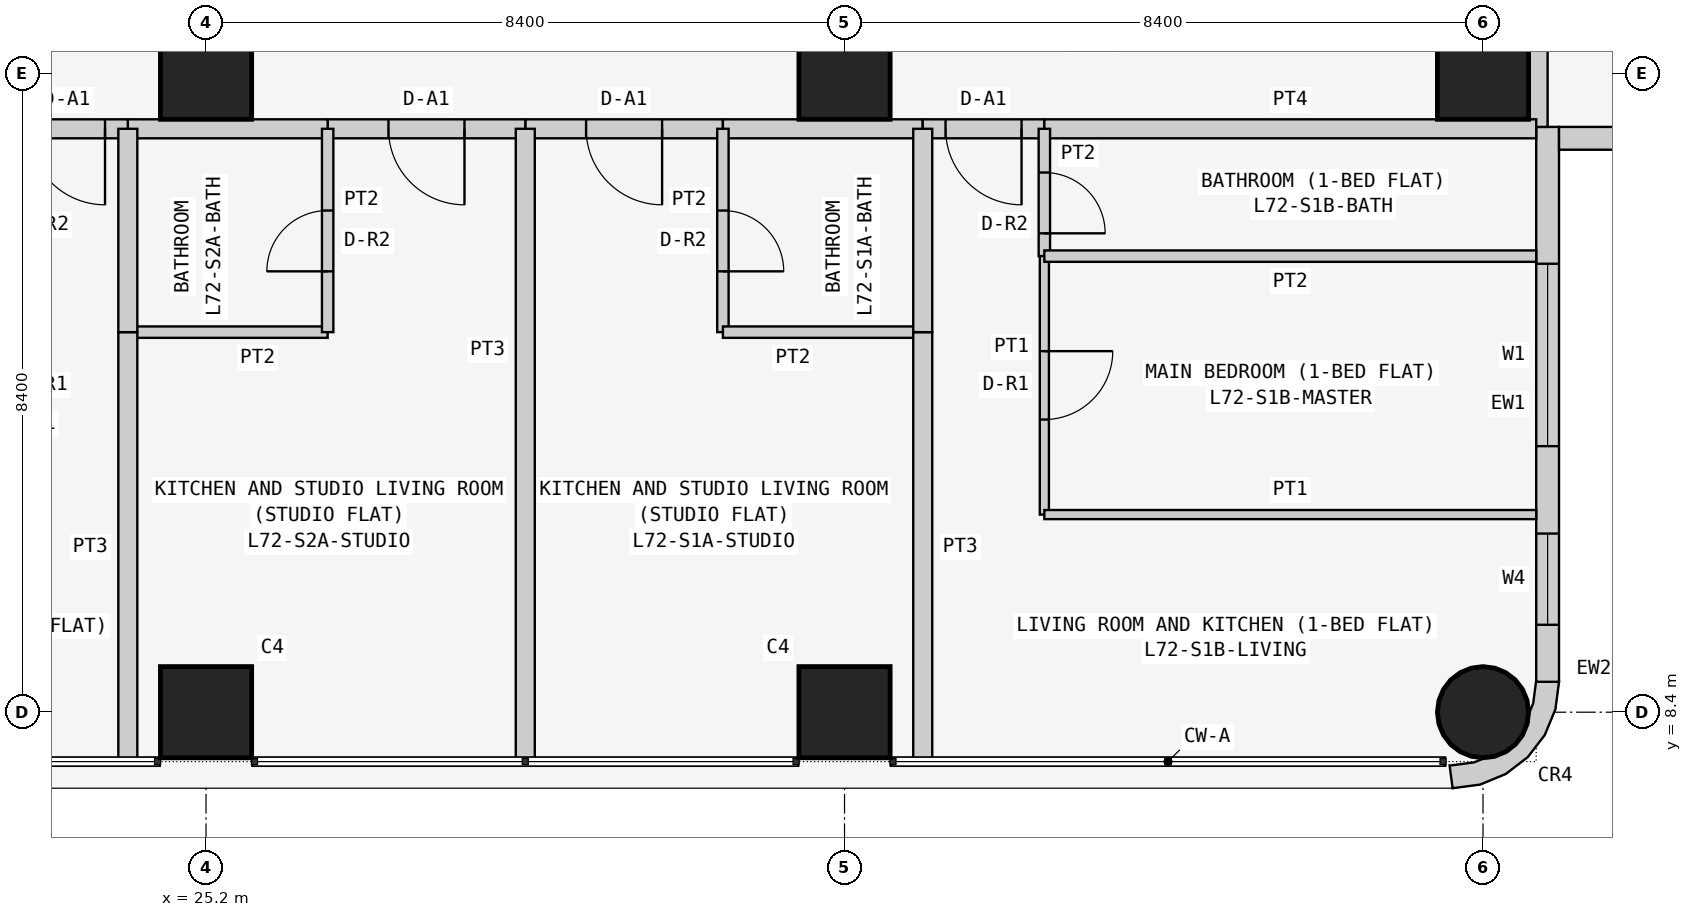
"""IFC4 building model, lengths in metres.
Left out: names, types, materials, properties, quantities, classifications, styles, units other than length and angle.
Written with IfcOpenShell. Run it as: python <this file> out.ifc"""

import sys

from ifc_helpers import new_model, si_unit, direction, frame, frame_2d, origin, origin_2d, place, context, subcontext, project, spatial, polyline, rectangle, circle, outline, extrude, element, fill, save


model = new_model("IFC4")
c1 = context("Model", 3, precision=1e-05, world=origin(), true_north=direction((0.0, 1.0)))
c2 = subcontext(c1, "Body", "Model", "MODEL_VIEW")
j1 = project(units=[si_unit("LENGTHUNIT", "METRE"), si_unit("PLANEANGLEUNIT", "RADIAN")], contexts=[c1])
p1 = place(None, origin())
s1 = spatial("IfcSite", under=j1, at=p1, CompositionType="ELEMENT")
p2 = place(p1, origin())
s2 = spatial("IfcBuilding", under=s1, at=p2, CompositionType="ELEMENT")
p3 = place(p2, frame((0.0, 0.0, 275.7)))
s3 = spatial("IfcBuildingStorey", under=s2, at=p3, CompositionType="ELEMENT", Elevation=275.7)
for number, where, z_axis, x_axis in (
    (1, (25.2, 8.4, 0.0), (0.0, 0.0, 1.0), (1.0, 0.0, 0.0)),
    (2, (25.2, 16.8, 0.0), (0.0, 0.0, 1.0), (1.0, 0.0, 0.0)),
    (3, (33.6, 8.4, 0.0), (0.0, 0.0, 1.0), (1.0, 0.0, 0.0)),
    (4, (33.6, 16.8, 0.0), (0.0, 0.0, 1.0), (1.0, 0.0, 0.0)),
):
    element("IfcColumn", number, at=place(p3, frame(where, z_axis=z_axis, x_axis=x_axis)), inside=s3, PredefinedType="COLUMN", context=c2, shape_type="SweptSolid", body=[
        extrude(rectangle(XDim=1.2, YDim=1.2, at=origin_2d()), origin(), (0.0, 0.0, 1.0), 3.6),
    ])
p4 = place(p3, frame((42.0, 8.4, 0.0), z_axis=(0.0, 0.0, 1.0), x_axis=(1.0, 0.0, 0.0)))
e5 = element("IfcColumn", 5, at=p4, inside=s3, PredefinedType="COLUMN", context=c2, shape_type="SweptSolid", body=[
    extrude(circle(Radius=0.6, at=origin_2d()), origin(), (0.0, 0.0, 1.0), 3.6),
])
p5 = place(p3, frame((42.0, 16.8, 0.0), z_axis=(0.0, 0.0, 1.0), x_axis=(1.0, 0.0, 0.0)))
e6 = element("IfcColumn", 6, at=p5, inside=s3, PredefinedType="COLUMN", context=c2, shape_type="SweptSolid", body=[
    extrude(rectangle(XDim=1.2, YDim=1.2, at=origin_2d()), origin(), (0.0, 0.0, 1.0), 3.6),
])
p6 = place(p3, frame((42.85, 8.8, 0.0), z_axis=(0.0, 0.0, 1.0), x_axis=(0.0, 1.0, 0.0)))
e7 = element("IfcWall", 7, at=p6, inside=s3, PredefinedType="SOLIDWALL", context=c2, shape_type="SweptSolid", body=[
    extrude(rectangle(XDim=7.3, YDim=0.3, at=frame_2d((3.65, 0.0))), origin(), (0.0, 0.0, 1.0), 3.45),
])
p7 = place(p6, frame((3.1, 0.0, 0.9)))
e8 = element("IfcOpeningElement", 8, at=p7, cuts=e7, PredefinedType="OPENING", context=c2, shape_type="SweptSolid", body=[
    extrude(rectangle(XDim=2.4, YDim=1.5, at=frame_2d((1.2, 0.75))), frame((0.0, 0.16, 0.0), z_axis=(0.0, -1.0, 0.0), x_axis=(1.0, 0.0, 0.0)), (0.0, 0.0, 1.0), 0.32),
])
p8 = place(p6, frame((0.75, 0.0, 0.9)))
e9 = element("IfcOpeningElement", 9, at=p8, cuts=e7, PredefinedType="OPENING", context=c2, shape_type="SweptSolid", body=[
    extrude(rectangle(XDim=1.2, YDim=1.5, at=frame_2d((0.6, 0.75))), frame((0.0, 0.16, 0.0), z_axis=(0.0, -1.0, 0.0), x_axis=(1.0, 0.0, 0.0)), (0.0, 0.0, 1.0), 0.32),
])
p9 = place(p3, frame((43.0, 15.95, 0.0), z_axis=(0.0, 0.0, 1.0), x_axis=(1.0, 0.0, 0.0)))
e10 = element("IfcWall", 10, at=p9, inside=s3, PredefinedType="SOLIDWALL", context=c2, shape_type="SweptSolid", body=[
    extrude(rectangle(XDim=7.0, YDim=0.3, at=frame_2d((3.5, 0.0))), origin(), (0.0, 0.0, 1.0), 3.45),
])
p10 = place(p9, frame((1.5, 0.0, 0.9)))
e11 = element("IfcOpeningElement", 11, at=p10, cuts=e10, PredefinedType="OPENING", context=c2, shape_type="SweptSolid", body=[
    extrude(rectangle(XDim=2.4, YDim=1.5, at=frame_2d((1.2, 0.75))), frame((0.0, 0.16, 0.0), z_axis=(0.0, -1.0, 0.0), x_axis=(1.0, 0.0, 0.0)), (0.0, 0.0, 1.0), 0.32),
])
p11 = place(p9, frame((5.05, 0.0, 0.9)))
e12 = element("IfcOpeningElement", 12, at=p11, cuts=e10, PredefinedType="OPENING", context=c2, shape_type="SweptSolid", body=[
    extrude(rectangle(XDim=1.2, YDim=1.5, at=frame_2d((0.6, 0.75))), frame((0.0, 0.16, 0.0), z_axis=(0.0, -1.0, 0.0), x_axis=(1.0, 0.0, 0.0)), (0.0, 0.0, 1.0), 0.32),
])
p12 = place(p3, frame((41.638, 7.824, 0.0), z_axis=(0.0, 0.0, 1.0), x_axis=(0.707106781187, -0.707106781187, 0.0)))
e13 = element("IfcWall", 13, at=p12, inside=s3, PredefinedType="SOLIDWALL", context=c2, shape_type="SweptSolid", body=[
    extrude(outline(polyline([(0.033, 1.469), (0.047, 1.455), (0.233, 1.212), (0.292, 1.069), (0.358, 1.003), (0.449, 0.782), (0.449, 0.543), (0.358, 0.322), (0.292, 0.257), (0.233, 0.114), (0.047, -0.129), (0.033, -0.143), (0.273, -0.327), (0.495, -0.037), (0.635, 0.301), (0.683, 0.663), (0.635, 1.025), (0.495, 1.363), (0.273, 1.653), (0.033, 1.469)])), origin(), (0.0, 0.0, 1.0), 3.45),
])
p13 = place(p3, frame((42.725, 22.971, 0.0), z_axis=(0.0, 0.0, 1.0), x_axis=(0.0, -1.0, 0.0)))
e14 = element("IfcWall", 14, at=p13, inside=s3, PredefinedType="PARTITIONING", context=c2, shape_type="SweptSolid", body=[
    extrude(rectangle(XDim=6.871, YDim=0.25, at=frame_2d((3.436, 0.0))), origin(), (0.0, 0.0, 1.0), 3.45),
])
p14 = place(p3, frame((32.0, 16.075, 0.0), z_axis=(0.0, 0.0, 1.0), x_axis=(-1.0, 0.0, 0.0)))
e15 = element("IfcWall", 15, at=p14, inside=s3, PredefinedType="PARTITIONING", context=c2, shape_type="SweptSolid", body=[
    extrude(rectangle(XDim=2.6, YDim=0.25, at=frame_2d((1.3, 0.0))), origin(), (0.0, 0.0, 1.0), 3.45),
])
p15 = place(p14, frame((0.8, 0.0, 0.0)))
e16 = element("IfcOpeningElement", 16, at=p15, cuts=e15, PredefinedType="OPENING", context=c2, shape_type="SweptSolid", body=[
    extrude(rectangle(XDim=1.0, YDim=2.1, at=frame_2d((0.5, 1.05))), frame((0.0, 0.135, 0.0), z_axis=(0.0, -1.0, 0.0), x_axis=(1.0, 0.0, 0.0)), (0.0, 0.0, 1.0), 0.27),
])
p16 = place(p3, frame((34.629, 16.075, 0.0), z_axis=(0.0, 0.0, 1.0), x_axis=(-1.0, 0.0, 0.0)))
e17 = element("IfcWall", 17, at=p16, inside=s3, PredefinedType="PARTITIONING", context=c2, shape_type="SweptSolid", body=[
    extrude(rectangle(XDim=2.629, YDim=0.25, at=frame_2d((1.314, 0.0))), origin(), (0.0, 0.0, 1.0), 3.45),
])
p17 = place(p3, frame((36.229, 16.075, 0.0), z_axis=(0.0, 0.0, 1.0), x_axis=(-1.0, 0.0, 0.0)))
e18 = element("IfcWall", 18, at=p17, inside=s3, PredefinedType="PARTITIONING", context=c2, shape_type="SweptSolid", body=[
    extrude(rectangle(XDim=1.6, YDim=0.25, at=frame_2d((0.8, 0.0))), origin(), (0.0, 0.0, 1.0), 3.45),
])
p18 = place(p17, frame((0.3, 0.0, 0.0)))
e19 = element("IfcOpeningElement", 19, at=p18, cuts=e18, PredefinedType="OPENING", context=c2, shape_type="SweptSolid", body=[
    extrude(rectangle(XDim=1.0, YDim=2.1, at=frame_2d((0.5, 1.05))), frame((0.0, 0.135, 0.0), z_axis=(0.0, -1.0, 0.0), x_axis=(1.0, 0.0, 0.0)), (0.0, 0.0, 1.0), 0.27),
])
p19 = place(p3, frame((42.7, 16.075, 0.0), z_axis=(0.0, 0.0, 1.0), x_axis=(-1.0, 0.0, 0.0)))
e20 = element("IfcWall", 20, at=p19, inside=s3, PredefinedType="PARTITIONING", context=c2, shape_type="SweptSolid", body=[
    extrude(rectangle(XDim=6.471, YDim=0.25, at=frame_2d((3.235, 0.0))), origin(), (0.0, 0.0, 1.0), 3.45),
])
p20 = place(p3, frame((29.4, 16.075, 0.0), z_axis=(0.0, 0.0, 1.0), x_axis=(-1.0, 0.0, 0.0)))
e21 = element("IfcWall", 21, at=p20, inside=s3, PredefinedType="PARTITIONING", context=c2, shape_type="SweptSolid", body=[
    extrude(rectangle(XDim=2.6, YDim=0.25, at=frame_2d((1.3, 0.0))), origin(), (0.0, 0.0, 1.0), 3.45),
])
p21 = place(p20, frame((0.8, 0.0, 0.0)))
e22 = element("IfcOpeningElement", 22, at=p21, cuts=e21, PredefinedType="OPENING", context=c2, shape_type="SweptSolid", body=[
    extrude(rectangle(XDim=1.0, YDim=2.1, at=frame_2d((0.5, 1.05))), frame((0.0, 0.135, 0.0), z_axis=(0.0, -1.0, 0.0), x_axis=(1.0, 0.0, 0.0)), (0.0, 0.0, 1.0), 0.27),
])
p22 = place(p3, frame((26.8, 16.075, 0.0), z_axis=(0.0, 0.0, 1.0), x_axis=(-1.0, 0.0, 0.0)))
e23 = element("IfcWall", 23, at=p22, inside=s3, PredefinedType="PARTITIONING", context=c2, shape_type="SweptSolid", body=[
    extrude(rectangle(XDim=2.629, YDim=0.25, at=frame_2d((1.314, 0.0))), origin(), (0.0, 0.0, 1.0), 3.45),
])
p23 = place(p3, frame((24.171, 16.075, 0.0), z_axis=(0.0, 0.0, 1.0), x_axis=(-1.0, 0.0, 0.0)))
e24 = element("IfcWall", 24, at=p23, inside=s3, PredefinedType="PARTITIONING", context=c2, shape_type="SweptSolid", body=[
    extrude(rectangle(XDim=1.6, YDim=0.25, at=frame_2d((0.8, 0.0))), origin(), (0.0, 0.0, 1.0), 3.45),
])
p24 = place(p23, frame((0.3, 0.0, 0.0)))
e25 = element("IfcOpeningElement", 25, at=p24, cuts=e24, PredefinedType="OPENING", context=c2, shape_type="SweptSolid", body=[
    extrude(rectangle(XDim=1.0, YDim=2.1, at=frame_2d((0.5, 1.05))), frame((0.0, 0.135, 0.0), z_axis=(0.0, -1.0, 0.0), x_axis=(1.0, 0.0, 0.0)), (0.0, 0.0, 1.0), 0.27),
])
p25 = place(p3, frame((32.0, 16.075, 0.0), z_axis=(0.0, 0.0, 1.0), x_axis=(0.0, -1.0, 0.0)))
e26 = element("IfcWall", 26, at=p25, inside=s3, PredefinedType="PARTITIONING", context=c2, shape_type="SweptSolid", body=[
    extrude(rectangle(XDim=2.675, YDim=0.15, at=frame_2d((1.337, 0.0))), origin(), (0.0, 0.0, 1.0), 3.45),
])
p26 = place(p25, frame((1.075, 0.0, 0.0)))
e27 = element("IfcOpeningElement", 27, at=p26, cuts=e26, PredefinedType="OPENING", context=c2, shape_type="SweptSolid", body=[
    extrude(rectangle(XDim=0.8, YDim=2.1, at=frame_2d((0.4, 1.05))), frame((0.0, 0.085, 0.0), z_axis=(0.0, -1.0, 0.0), x_axis=(1.0, 0.0, 0.0)), (0.0, 0.0, 1.0), 0.17),
])
p27 = place(p3, frame((32.0, 13.4, 0.0), z_axis=(0.0, 0.0, 1.0), x_axis=(1.0, 0.0, 0.0)))
e28 = element("IfcWall", 28, at=p27, inside=s3, PredefinedType="PARTITIONING", context=c2, shape_type="SweptSolid", body=[
    extrude(rectangle(XDim=2.629, YDim=0.15, at=frame_2d((1.314, 0.0))), origin(), (0.0, 0.0, 1.0), 3.45),
])
p28 = place(p3, frame((34.629, 13.4, 0.0), z_axis=(0.0, 0.0, 1.0), x_axis=(0.0, -1.0, 0.0)))
e29 = element("IfcWall", 29, at=p28, inside=s3, PredefinedType="PARTITIONING", context=c2, shape_type="SweptSolid", body=[
    extrude(rectangle(XDim=5.65, YDim=0.25, at=frame_2d((2.825, 0.0))), origin(), (0.0, 0.0, 1.0), 3.45),
])
p29 = place(p3, frame((29.4, 7.75, 0.0), z_axis=(0.0, 0.0, 1.0), x_axis=(0.0, 1.0, 0.0)))
e30 = element("IfcWall", 30, at=p29, inside=s3, PredefinedType="PARTITIONING", context=c2, shape_type="SweptSolid", body=[
    extrude(rectangle(XDim=8.325, YDim=0.25, at=frame_2d((4.163, 0.0))), origin(), (0.0, 0.0, 1.0), 2.848),
])
p30 = place(p3, frame((34.629, 13.4, 0.0), z_axis=(0.0, 0.0, 1.0), x_axis=(0.0, 1.0, 0.0)))
e31 = element("IfcWall", 31, at=p30, inside=s3, PredefinedType="PARTITIONING", context=c2, shape_type="SweptSolid", body=[
    extrude(rectangle(XDim=2.675, YDim=0.25, at=frame_2d((1.337, 0.0))), origin(), (0.0, 0.0, 1.0), 3.45),
])
p31 = place(p3, frame((36.229, 16.075, 0.0), z_axis=(0.0, 0.0, 1.0), x_axis=(0.0, -1.0, 0.0)))
e32 = element("IfcWall", 32, at=p31, inside=s3, PredefinedType="PARTITIONING", context=c2, shape_type="SweptSolid", body=[
    extrude(rectangle(XDim=1.675, YDim=0.15, at=frame_2d((0.837, 0.0))), origin(), (0.0, 0.0, 1.0), 3.45),
])
p32 = place(p31, frame((0.575, 0.0, 0.0)))
e33 = element("IfcOpeningElement", 33, at=p32, cuts=e32, PredefinedType="OPENING", context=c2, shape_type="SweptSolid", body=[
    extrude(rectangle(XDim=0.8, YDim=2.1, at=frame_2d((0.4, 1.05))), frame((0.0, 0.085, 0.0), z_axis=(0.0, -1.0, 0.0), x_axis=(1.0, 0.0, 0.0)), (0.0, 0.0, 1.0), 0.17),
])
p33 = place(p3, frame((36.229, 14.4, 0.0), z_axis=(0.0, 0.0, 1.0), x_axis=(0.0, -1.0, 0.0)))
e34 = element("IfcWall", 34, at=p33, inside=s3, PredefinedType="PARTITIONING", context=c2, shape_type="SweptSolid", body=[
    extrude(rectangle(XDim=3.4, YDim=0.12, at=frame_2d((1.7, 0.0))), origin(), (0.0, 0.0, 1.0), 3.45),
])
p34 = place(p33, frame((1.25, 0.0, 0.0)))
e35 = element("IfcOpeningElement", 35, at=p34, cuts=e34, PredefinedType="OPENING", context=c2, shape_type="SweptSolid", body=[
    extrude(rectangle(XDim=0.9, YDim=2.1, at=frame_2d((0.45, 1.05))), frame((0.0, 0.07, 0.0), z_axis=(0.0, -1.0, 0.0), x_axis=(1.0, 0.0, 0.0)), (0.0, 0.0, 1.0), 0.14),
])
p35 = place(p3, frame((36.229, 11.0, 0.0), z_axis=(0.0, 0.0, 1.0), x_axis=(1.0, 0.0, 0.0)))
e36 = element("IfcWall", 36, at=p35, inside=s3, PredefinedType="PARTITIONING", context=c2, shape_type="SweptSolid", body=[
    extrude(rectangle(XDim=6.471, YDim=0.12, at=frame_2d((3.235, 0.0))), origin(), (0.0, 0.0, 1.0), 3.45),
])
p36 = place(p3, frame((36.229, 14.4, 0.0), z_axis=(0.0, 0.0, 1.0), x_axis=(1.0, 0.0, 0.0)))
e37 = element("IfcWall", 37, at=p36, inside=s3, PredefinedType="PARTITIONING", context=c2, shape_type="SweptSolid", body=[
    extrude(rectangle(XDim=6.471, YDim=0.15, at=frame_2d((3.235, 0.0))), origin(), (0.0, 0.0, 1.0), 3.45),
])
p37 = place(p3, frame((24.171, 13.4, 0.0), z_axis=(0.0, 0.0, 1.0), x_axis=(1.0, 0.0, 0.0)))
e38 = element("IfcWall", 38, at=p37, inside=s3, PredefinedType="PARTITIONING", context=c2, shape_type="SweptSolid", body=[
    extrude(rectangle(XDim=2.629, YDim=0.15, at=frame_2d((1.314, 0.0))), origin(), (0.0, 0.0, 1.0), 3.45),
])
p38 = place(p3, frame((26.8, 13.4, 0.0), z_axis=(0.0, 0.0, 1.0), x_axis=(0.0, 1.0, 0.0)))
e39 = element("IfcWall", 39, at=p38, inside=s3, PredefinedType="PARTITIONING", context=c2, shape_type="SweptSolid", body=[
    extrude(rectangle(XDim=2.675, YDim=0.15, at=frame_2d((1.337, 0.0))), origin(), (0.0, 0.0, 1.0), 3.45),
])
p39 = place(p38, frame((0.8, 0.0, 0.0)))
e40 = element("IfcOpeningElement", 40, at=p39, cuts=e39, PredefinedType="OPENING", context=c2, shape_type="SweptSolid", body=[
    extrude(rectangle(XDim=0.8, YDim=2.1, at=frame_2d((0.4, 1.05))), frame((0.0, 0.085, 0.0), z_axis=(0.0, -1.0, 0.0), x_axis=(1.0, 0.0, 0.0)), (0.0, 0.0, 1.0), 0.17),
])
p40 = place(p3, frame((24.171, 7.75, 0.0), z_axis=(0.0, 0.0, 1.0), x_axis=(0.0, 1.0, 0.0)))
e41 = element("IfcWall", 41, at=p40, inside=s3, PredefinedType="PARTITIONING", context=c2, shape_type="SweptSolid", body=[
    extrude(rectangle(XDim=5.65, YDim=0.25, at=frame_2d((2.825, 0.0))), origin(), (0.0, 0.0, 1.0), 3.45),
])
p41 = place(p3, frame((24.171, 13.4, 0.0), z_axis=(0.0, 0.0, 1.0), x_axis=(0.0, 1.0, 0.0)))
e42 = element("IfcWall", 42, at=p41, inside=s3, PredefinedType="PARTITIONING", context=c2, shape_type="SweptSolid", body=[
    extrude(rectangle(XDim=2.675, YDim=0.25, at=frame_2d((1.337, 0.0))), origin(), (0.0, 0.0, 1.0), 3.45),
])
p42 = place(p7, origin())
e43 = element("IfcWindow", 43, at=p42, inside=s3, PartitioningType="SINGLE_PANEL", PredefinedType="WINDOW", context=c2, shape_type="SweptSolid", body=[
    extrude(rectangle(XDim=2.4, YDim=1.5, at=frame_2d((1.2, 0.75))), frame((0.0, 0.03, 0.0), z_axis=(0.0, -1.0, 0.0), x_axis=(1.0, 0.0, 0.0)), (0.0, 0.0, 1.0), 0.06),
])
fill(e8, e43)
p43 = place(p8, origin())
e44 = element("IfcWindow", 44, at=p43, inside=s3, PartitioningType="SINGLE_PANEL", PredefinedType="WINDOW", context=c2, shape_type="SweptSolid", body=[
    extrude(rectangle(XDim=1.2, YDim=1.5, at=frame_2d((0.6, 0.75))), frame((0.0, 0.03, 0.0), z_axis=(0.0, -1.0, 0.0), x_axis=(1.0, 0.0, 0.0)), (0.0, 0.0, 1.0), 0.06),
])
fill(e9, e44)
p44 = place(p15, origin())
e45 = element("IfcDoor", 45, at=p44, inside=s3, OperationType="SINGLE_SWING_LEFT", PredefinedType="DOOR", context=c2, shape_type="SweptSolid", body=[
    extrude(rectangle(XDim=1.0, YDim=2.1, at=frame_2d((0.5, 1.05))), frame((0.0, 0.025, 0.0), z_axis=(0.0, -1.0, 0.0), x_axis=(1.0, 0.0, 0.0)), (0.0, 0.0, 1.0), 0.05),
])
fill(e16, e45)
p45 = place(p26, origin())
e46 = element("IfcDoor", 46, at=p45, inside=s3, OperationType="SINGLE_SWING_RIGHT", PredefinedType="DOOR", context=c2, shape_type="SweptSolid", body=[
    extrude(rectangle(XDim=0.8, YDim=2.1, at=frame_2d((0.4, 1.05))), frame((0.0, 0.025, 0.0), z_axis=(0.0, -1.0, 0.0), x_axis=(1.0, 0.0, 0.0)), (0.0, 0.0, 1.0), 0.05),
])
fill(e27, e46)
p46 = place(p18, origin())
e47 = element("IfcDoor", 47, at=p46, inside=s3, OperationType="SINGLE_SWING_LEFT", PredefinedType="DOOR", context=c2, shape_type="SweptSolid", body=[
    extrude(rectangle(XDim=1.0, YDim=2.1, at=frame_2d((0.5, 1.05))), frame((0.0, 0.025, 0.0), z_axis=(0.0, -1.0, 0.0), x_axis=(1.0, 0.0, 0.0)), (0.0, 0.0, 1.0), 0.05),
])
fill(e19, e47)
p47 = place(p32, origin())
e48 = element("IfcDoor", 48, at=p47, inside=s3, OperationType="SINGLE_SWING_RIGHT", PredefinedType="DOOR", context=c2, shape_type="SweptSolid", body=[
    extrude(rectangle(XDim=0.8, YDim=2.1, at=frame_2d((0.4, 1.05))), frame((0.0, 0.025, 0.0), z_axis=(0.0, -1.0, 0.0), x_axis=(1.0, 0.0, 0.0)), (0.0, 0.0, 1.0), 0.05),
])
fill(e33, e48)
p48 = place(p34, origin())
e49 = element("IfcDoor", 49, at=p48, inside=s3, OperationType="SINGLE_SWING_LEFT", PredefinedType="DOOR", context=c2, shape_type="SweptSolid", body=[
    extrude(rectangle(XDim=0.9, YDim=2.1, at=frame_2d((0.45, 1.05))), frame((0.0, 0.025, 0.0), z_axis=(0.0, -1.0, 0.0), x_axis=(1.0, 0.0, 0.0)), (0.0, 0.0, 1.0), 0.05),
])
fill(e35, e49)
p49 = place(p21, origin())
e50 = element("IfcDoor", 50, at=p49, inside=s3, OperationType="SINGLE_SWING_LEFT", PredefinedType="DOOR", context=c2, shape_type="SweptSolid", body=[
    extrude(rectangle(XDim=1.0, YDim=2.1, at=frame_2d((0.5, 1.05))), frame((0.0, 0.025, 0.0), z_axis=(0.0, -1.0, 0.0), x_axis=(1.0, 0.0, 0.0)), (0.0, 0.0, 1.0), 0.05),
])
fill(e22, e50)
p50 = place(p39, origin())
e51 = element("IfcDoor", 51, at=p50, inside=s3, OperationType="SINGLE_SWING_LEFT", PredefinedType="DOOR", context=c2, shape_type="SweptSolid", body=[
    extrude(rectangle(XDim=0.8, YDim=2.1, at=frame_2d((0.4, 1.05))), frame((0.0, 0.025, 0.0), z_axis=(0.0, -1.0, 0.0), x_axis=(1.0, 0.0, 0.0)), (0.0, 0.0, 1.0), 0.05),
])
fill(e40, e51)
p51 = place(p24, origin())
e52 = element("IfcDoor", 52, at=p51, inside=s3, OperationType="SINGLE_SWING_LEFT", PredefinedType="DOOR", context=c2, shape_type="SweptSolid", body=[
    extrude(rectangle(XDim=1.0, YDim=2.1, at=frame_2d((0.5, 1.05))), frame((0.0, 0.025, 0.0), z_axis=(0.0, -1.0, 0.0), x_axis=(1.0, 0.0, 0.0)), (0.0, 0.0, 1.0), 0.05),
])
fill(e25, e52)
save(model, sys.argv[1])
